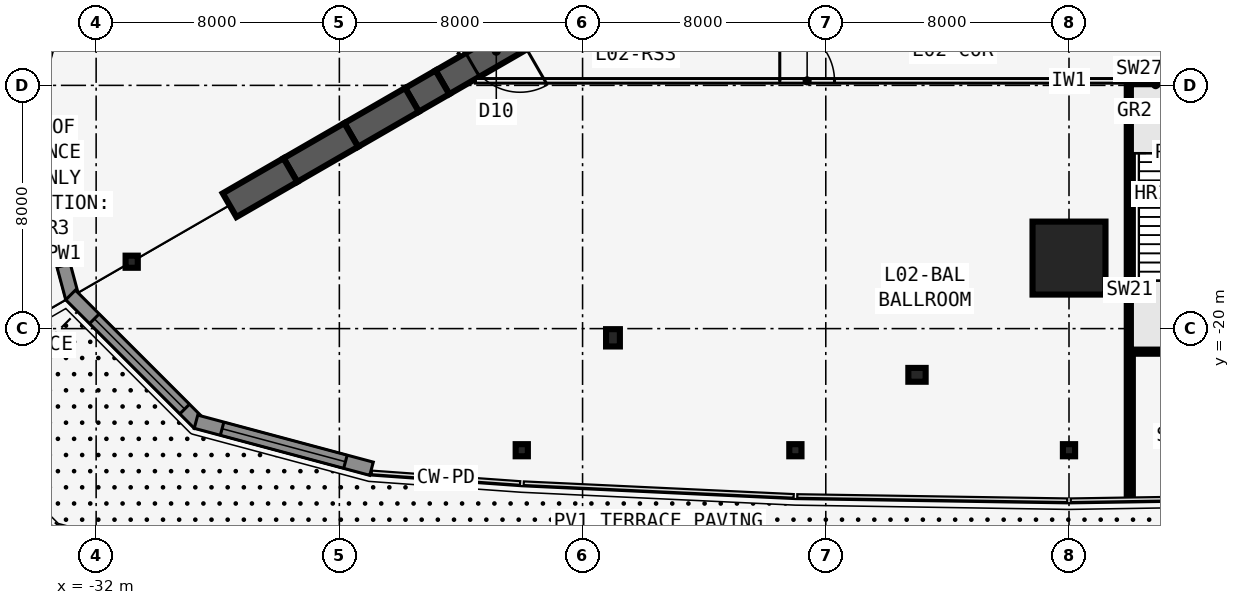
"""IFC4 building model, lengths in metres.
Left out: names, types, materials, properties, quantities, classifications, styles, units other than length and angle.
Written with IfcOpenShell. Run it as: python <this file> out.ifc"""

import sys

from ifc_helpers import new_model, si_unit, direction, frame, frame_2d, origin, origin_2d, place, context, subcontext, project, spatial, rectangle, i_section, extrude, element, fill, save


model = new_model("IFC4")
c1 = context("Model", 3, precision=1e-05, world=origin(), true_north=direction((0.0, 1.0)))
c2 = subcontext(c1, "Body", "Model", "MODEL_VIEW")
j1 = project(units=[si_unit("LENGTHUNIT", "METRE"), si_unit("PLANEANGLEUNIT", "RADIAN")], contexts=[c1])
p1 = place(None, origin())
s1 = spatial("IfcSite", under=j1, at=p1, CompositionType="ELEMENT")
p2 = place(p1, origin())
s2 = spatial("IfcBuilding", under=s1, at=p2, CompositionType="ELEMENT")
p3 = place(p2, frame((0.0, 0.0, 11.0)))
s3 = spatial("IfcBuildingStorey", under=s2, at=p3, CompositionType="ELEMENT", Elevation=11.0)
p4 = place(p3, frame((-16.5, -9.526, 0.0), z_axis=(0.0, 0.0, 1.0), x_axis=(-0.866031398331, -0.499989616998, 0.0)))
e1 = element("IfcWall", 1, at=p4, inside=s3, PredefinedType="SHEAR", context=c2, shape_type="SweptSolid", body=[
    extrude(rectangle(XDim=4.746, YDim=0.9, at=frame_2d((2.373, 0.0))), origin(), (0.0, 0.0, 1.0), 6.5),
])
p5 = place(p4, frame((1.8, 0.0, 0.0)))
e2 = element("IfcOpeningElement", 2, at=p5, cuts=e1, PredefinedType="OPENING", context=c2, shape_type="SweptSolid", body=[
    extrude(rectangle(XDim=1.8, YDim=2.13, at=frame_2d((0.9, 1.065))), frame((0.0, 0.46, 0.0), z_axis=(0.0, -1.0, 0.0), x_axis=(1.0, 0.0, 0.0)), (0.0, 0.0, 1.0), 0.92),
])
p6 = place(p3, frame((-20.61, -11.899, 0.0), z_axis=(0.0, 0.0, 1.0), x_axis=(-0.866009537788, -0.500027479704, 0.0)))
e3 = element("IfcWall", 3, at=p6, inside=s3, PredefinedType="SHEAR", context=c2, shape_type="SweptSolid", body=[
    extrude(rectangle(XDim=1.155, YDim=0.9, at=frame_2d((0.577, 0.0))), origin(), (0.0, 0.0, 1.0), 6.5),
])
for number, where, z_axis, x_axis in (
    (4, (-21.61, -12.477, 0.0), (0.0, 0.0, 1.0), (-0.866, -0.5, 0.0)),
    (5, (-23.61, -13.631, 0.0), (0.0, 0.0, 1.0), (-0.866, -0.5, 0.0)),
    (6, (-25.61, -14.786, 0.0), (0.0, 0.0, 1.0), (-0.866, -0.5, 0.0)),
):
    element("IfcWall", number, at=place(p3, frame(where, z_axis=z_axis, x_axis=x_axis)), inside=s3, PredefinedType="SHEAR", context=c2, shape_type="SweptSolid", body=[
        extrude(rectangle(XDim=2.309, YDim=0.9, at=frame_2d((1.155, 0.0))), origin(), (0.0, 0.0, 1.0), 6.5),
    ])
for number, where, z_axis, x_axis in (
    (7, (-15.0, -20.303, 0.0), (0.0, 0.0, 1.0), (1.0, 0.0, 0.0)),
    (8, (-5.0, -21.521, 0.0), (0.0, 0.0, 1.0), (0.0, -1.0, 0.0)),
):
    element("IfcColumn", number, at=place(p3, frame(where, z_axis=z_axis, x_axis=x_axis)), inside=s3, PredefinedType="COLUMN", context=c2, shape_type="SweptSolid", body=[
        extrude(i_section(OverallWidth=0.455, OverallDepth=0.569, WebThickness=0.078, FlangeThickness=0.125, at=origin_2d()), origin(), (0.0, 0.0, 1.0), 6.5),
    ])
for number, where, z_axis, x_axis in (
    (9, (-30.831, -17.8, 0.0), (0.0, 0.0, 1.0), (1.0, 0.0, 0.0)),
    (10, (-18.0, -24.0, 0.0), (0.0, 0.0, 1.0), (1.0, 0.0, 0.0)),
    (11, (-9.0, -24.0, 0.0), (0.0, 0.0, 1.0), (1.0, 0.0, 0.0)),
    (12, (0.0, -24.0, 0.0), (0.0, 0.0, 1.0), (1.0, 0.0, 0.0)),
):
    element("IfcColumn", number, at=place(p3, frame(where, z_axis=z_axis, x_axis=x_axis)), inside=s3, PredefinedType="COLUMN", context=c2, shape_type="SweptSolid", body=[
        extrude(i_section(OverallWidth=0.401, OverallDepth=0.399, WebThickness=0.025, FlangeThickness=0.04, at=origin_2d()), origin(), (0.0, 0.0, 1.0), 6.5),
    ])
p7 = place(p3, frame((0.0, -17.68, 0.0), z_axis=(0.0, 0.0, 1.0), x_axis=(0.0, -1.0, 0.0)))
e13 = element("IfcColumn", 13, at=p7, inside=s3, PredefinedType="COLUMN", context=c2, shape_type="SweptSolid", body=[
    extrude(rectangle(XDim=2.4, YDim=2.4, at=origin_2d()), origin(), (0.0, 0.0, 1.0), 6.5),
])
p8 = place(p3, frame((-32.783, -7.564, 0.0), z_axis=(0.0, 0.0, 1.0), x_axis=(-0.258791208569, -0.965933284636, 0.0)))
e14 = element("IfcWall", 14, at=p8, inside=s3, PredefinedType="SOLIDWALL", context=c2, shape_type="SweptSolid", body=[
    extrude(rectangle(XDim=5.977, YDim=0.45, at=frame_2d((2.989, 0.0))), origin(), (0.0, 0.0, 1.0), 6.25),
])
p9 = place(p8, frame((0.889, 0.0, 1.2)))
e15 = element("IfcOpeningElement", 15, at=p9, cuts=e14, PredefinedType="OPENING", context=c2, shape_type="SweptSolid", body=[
    extrude(rectangle(XDim=4.2, YDim=3.6, at=frame_2d((2.1, 1.8))), frame((0.0, 0.235, 0.0), z_axis=(0.0, -1.0, 0.0), x_axis=(1.0, 0.0, 0.0)), (0.0, 0.0, 1.0), 0.47),
])
p10 = place(p3, frame((-34.33, -13.221, 0.0), z_axis=(0.0, 0.0, 1.0), x_axis=(0.258801419081, -0.965930548995, 0.0)))
e16 = element("IfcWall", 16, at=p10, inside=s3, PredefinedType="SOLIDWALL", context=c2, shape_type="SweptSolid", body=[
    extrude(rectangle(XDim=5.977, YDim=0.45, at=frame_2d((2.989, 0.0))), origin(), (0.0, 0.0, 1.0), 6.25),
])
p11 = place(p10, frame((0.67, 0.0, 1.2)))
e17 = element("IfcOpeningElement", 17, at=p11, cuts=e16, PredefinedType="OPENING", context=c2, shape_type="SweptSolid", body=[
    extrude(rectangle(XDim=4.2, YDim=3.6, at=frame_2d((2.1, 1.8))), frame((0.0, 0.235, 0.0), z_axis=(0.0, -1.0, 0.0), x_axis=(1.0, 0.0, 0.0)), (0.0, 0.0, 1.0), 0.47),
])
p12 = place(p3, frame((-32.841, -18.894, 0.0), z_axis=(0.0, 0.0, 1.0), x_axis=(0.707086357855, -0.707127203928, 0.0)))
e18 = element("IfcWall", 18, at=p12, inside=s3, PredefinedType="SOLIDWALL", context=c2, shape_type="SweptSolid", body=[
    extrude(rectangle(XDim=5.977, YDim=0.45, at=frame_2d((2.989, 0.0))), origin(), (0.0, 0.0, 1.0), 6.25),
])
p13 = place(p12, frame((1.107, 0.0, 1.2)))
e19 = element("IfcOpeningElement", 19, at=p13, cuts=e18, PredefinedType="OPENING", context=c2, shape_type="SweptSolid", body=[
    extrude(rectangle(XDim=4.2, YDim=3.6, at=frame_2d((2.1, 1.8))), frame((0.0, 0.235, 0.0), z_axis=(0.0, -1.0, 0.0), x_axis=(1.0, 0.0, 0.0)), (0.0, 0.0, 1.0), 0.47),
])
p14 = place(p3, frame((-28.715, -23.062, 0.0), z_axis=(0.0, 0.0, 1.0), x_axis=(0.965920337451, -0.258839528858, 0.0)))
e20 = element("IfcWall", 20, at=p14, inside=s3, PredefinedType="SOLIDWALL", context=c2, shape_type="SweptSolid", body=[
    extrude(rectangle(XDim=5.977, YDim=0.45, at=frame_2d((2.989, 0.0))), origin(), (0.0, 0.0, 1.0), 6.25),
])
p15 = place(p14, frame((0.889, 0.0, 1.2)))
e21 = element("IfcOpeningElement", 21, at=p15, cuts=e20, PredefinedType="OPENING", context=c2, shape_type="SweptSolid", body=[
    extrude(rectangle(XDim=4.2, YDim=3.6, at=frame_2d((2.1, 1.8))), frame((0.0, 0.235, 0.0), z_axis=(0.0, -1.0, 0.0), x_axis=(1.0, 0.0, 0.0)), (0.0, 0.0, 1.0), 0.47),
])
p16 = place(p3, frame((-19.527, -11.851, 0.0), z_axis=(0.0, 0.0, 1.0), x_axis=(1.0, 0.0, 0.0)))
e22 = element("IfcWall", 22, at=p16, inside=s3, PredefinedType="PARTITIONING", context=c2, shape_type="SweptSolid", body=[
    extrude(rectangle(XDim=39.054, YDim=0.15, at=frame_2d((19.527, 0.0))), origin(), (0.0, 0.0, 1.0), 5.308),
])
p17 = place(p16, frame((10.013, 0.0, 0.0)))
e23 = element("IfcOpeningElement", 23, at=p17, cuts=e22, PredefinedType="OPENING", context=c2, shape_type="SweptSolid", body=[
    extrude(rectangle(XDim=1.8, YDim=2.13, at=frame_2d((0.9, 1.065))), frame((0.0, 0.085, 0.0), z_axis=(0.0, -1.0, 0.0), x_axis=(1.0, 0.0, 0.0)), (0.0, 0.0, 1.0), 0.17),
])
p18 = place(p16, frame((23.227, 0.0, 0.0)))
e24 = element("IfcOpeningElement", 24, at=p18, cuts=e22, PredefinedType="OPENING", context=c2, shape_type="SweptSolid", body=[
    extrude(rectangle(XDim=1.8, YDim=2.13, at=frame_2d((0.9, 1.065))), frame((0.0, 0.085, 0.0), z_axis=(0.0, -1.0, 0.0), x_axis=(1.0, 0.0, 0.0)), (0.0, 0.0, 1.0), 0.17),
])
p19 = place(p16, frame((31.841, 0.0, 0.0)))
e25 = element("IfcOpeningElement", 25, at=p19, cuts=e22, PredefinedType="OPENING", context=c2, shape_type="SweptSolid", body=[
    extrude(rectangle(XDim=1.8, YDim=2.13, at=frame_2d((0.9, 1.065))), frame((0.0, 0.085, 0.0), z_axis=(0.0, -1.0, 0.0), x_axis=(1.0, 0.0, 0.0)), (0.0, 0.0, 1.0), 0.17),
])
p20 = place(p3, frame((2.0, -11.926, 0.0), z_axis=(0.0, 0.0, 1.0), x_axis=(0.0, -1.0, 0.0)))
e26 = element("IfcWall", 26, at=p20, inside=s3, PredefinedType="SHEAR", context=c2, shape_type="SweptSolid", body=[
    extrude(rectangle(XDim=13.607, YDim=0.2, at=frame_2d((6.804, 0.0))), origin(), (0.0, 0.0, 1.0), 6.5),
])
p21 = place(p3, frame((20.027, -10.985, 0.0), z_axis=(0.0, 0.0, 1.0), x_axis=(-0.500001677587, 0.866024435227, 0.0)))
e27 = element("IfcWall", 27, at=p21, inside=s3, PredefinedType="PARTITIONING", context=c2, shape_type="SweptSolid", body=[
    extrude(rectangle(XDim=39.054, YDim=0.15, at=frame_2d((19.527, 0.0))), origin(), (0.0, 0.0, 1.0), 5.308),
])
p22 = place(p21, frame((10.013, 0.0, 0.0)))
e28 = element("IfcOpeningElement", 28, at=p22, cuts=e27, PredefinedType="OPENING", context=c2, shape_type="SweptSolid", body=[
    extrude(rectangle(XDim=1.8, YDim=2.13, at=frame_2d((0.9, 1.065))), frame((0.0, 0.085, 0.0), z_axis=(0.0, -1.0, 0.0), x_axis=(1.0, 0.0, 0.0)), (0.0, 0.0, 1.0), 0.17),
])
p23 = place(p21, frame((23.227, 0.0, 0.0)))
e29 = element("IfcOpeningElement", 29, at=p23, cuts=e27, PredefinedType="OPENING", context=c2, shape_type="SweptSolid", body=[
    extrude(rectangle(XDim=1.8, YDim=2.13, at=frame_2d((0.9, 1.065))), frame((0.0, 0.085, 0.0), z_axis=(0.0, -1.0, 0.0), x_axis=(1.0, 0.0, 0.0)), (0.0, 0.0, 1.0), 0.17),
])
p24 = place(p21, frame((27.627, 0.0, 0.0)))
e30 = element("IfcOpeningElement", 30, at=p24, cuts=e27, PredefinedType="OPENING", context=c2, shape_type="SweptSolid", body=[
    extrude(rectangle(XDim=1.0, YDim=2.13, at=frame_2d((0.5, 1.065))), frame((0.0, 0.085, 0.0), z_axis=(0.0, -1.0, 0.0), x_axis=(1.0, 0.0, 0.0)), (0.0, 0.0, 1.0), 0.17),
])
p25 = place(p21, frame((30.527, 0.0, 0.0)))
e31 = element("IfcOpeningElement", 31, at=p25, cuts=e27, PredefinedType="OPENING", context=c2, shape_type="SweptSolid", body=[
    extrude(rectangle(XDim=1.0, YDim=2.13, at=frame_2d((0.5, 1.065))), frame((0.0, 0.085, 0.0), z_axis=(0.0, -1.0, 0.0), x_axis=(1.0, 0.0, 0.0)), (0.0, 0.0, 1.0), 0.17),
])
p26 = place(p21, frame((33.277, 0.0, 0.0)))
e32 = element("IfcOpeningElement", 32, at=p26, cuts=e27, PredefinedType="OPENING", context=c2, shape_type="SweptSolid", body=[
    extrude(rectangle(XDim=1.0, YDim=2.13, at=frame_2d((0.5, 1.065))), frame((0.0, 0.085, 0.0), z_axis=(0.0, -1.0, 0.0), x_axis=(1.0, 0.0, 0.0)), (0.0, 0.0, 1.0), 0.17),
])
p27 = place(p21, frame((35.99, 0.0, 0.0)))
e33 = element("IfcOpeningElement", 33, at=p27, cuts=e27, PredefinedType="OPENING", context=c2, shape_type="SweptSolid", body=[
    extrude(rectangle(XDim=1.8, YDim=2.13, at=frame_2d((0.9, 1.065))), frame((0.0, 0.085, 0.0), z_axis=(0.0, -1.0, 0.0), x_axis=(1.0, 0.0, 0.0)), (0.0, 0.0, 1.0), 0.17),
])
p28 = place(p3, frame((-0.5, 22.836, 0.0), z_axis=(0.0, 0.0, 1.0), x_axis=(-0.500001677587, -0.866024435227, 0.0)))
e34 = element("IfcWall", 34, at=p28, inside=s3, PredefinedType="PARTITIONING", context=c2, shape_type="SweptSolid", body=[
    extrude(rectangle(XDim=39.054, YDim=0.15, at=frame_2d((19.527, 0.0))), origin(), (0.0, 0.0, 1.0), 5.308),
])
p29 = place(p28, frame((10.013, 0.0, 0.0)))
e35 = element("IfcOpeningElement", 35, at=p29, cuts=e34, PredefinedType="OPENING", context=c2, shape_type="SweptSolid", body=[
    extrude(rectangle(XDim=1.8, YDim=2.13, at=frame_2d((0.9, 1.065))), frame((0.0, 0.085, 0.0), z_axis=(0.0, -1.0, 0.0), x_axis=(1.0, 0.0, 0.0)), (0.0, 0.0, 1.0), 0.17),
])
p30 = place(p28, frame((23.227, 0.0, 0.0)))
e36 = element("IfcOpeningElement", 36, at=p30, cuts=e34, PredefinedType="OPENING", context=c2, shape_type="SweptSolid", body=[
    extrude(rectangle(XDim=1.8, YDim=2.13, at=frame_2d((0.9, 1.065))), frame((0.0, 0.085, 0.0), z_axis=(0.0, -1.0, 0.0), x_axis=(1.0, 0.0, 0.0)), (0.0, 0.0, 1.0), 0.17),
])
p31 = place(p28, frame((27.627, 0.0, 0.0)))
e37 = element("IfcOpeningElement", 37, at=p31, cuts=e34, PredefinedType="OPENING", context=c2, shape_type="SweptSolid", body=[
    extrude(rectangle(XDim=1.0, YDim=2.13, at=frame_2d((0.5, 1.065))), frame((0.0, 0.085, 0.0), z_axis=(0.0, -1.0, 0.0), x_axis=(1.0, 0.0, 0.0)), (0.0, 0.0, 1.0), 0.17),
])
p32 = place(p28, frame((30.277, 0.0, 0.0)))
e38 = element("IfcOpeningElement", 38, at=p32, cuts=e34, PredefinedType="OPENING", context=c2, shape_type="SweptSolid", body=[
    extrude(rectangle(XDim=1.0, YDim=2.13, at=frame_2d((0.5, 1.065))), frame((0.0, 0.085, 0.0), z_axis=(0.0, -1.0, 0.0), x_axis=(1.0, 0.0, 0.0)), (0.0, 0.0, 1.0), 0.17),
])
p33 = place(p28, frame((34.89, 0.0, 0.0)))
e39 = element("IfcOpeningElement", 39, at=p33, cuts=e34, PredefinedType="OPENING", context=c2, shape_type="SweptSolid", body=[
    extrude(rectangle(XDim=1.0, YDim=2.13, at=frame_2d((0.5, 1.065))), frame((0.0, 0.085, 0.0), z_axis=(0.0, -1.0, 0.0), x_axis=(1.0, 0.0, 0.0)), (0.0, 0.0, 1.0), 0.17),
])
p34 = place(p3, frame((2.0, -20.726, 0.0), z_axis=(0.0, 0.0, 1.0), x_axis=(1.0, 0.0, 0.0)))
e40 = element("IfcWall", 40, at=p34, inside=s3, PredefinedType="SHEAR", context=c2, shape_type="SweptSolid", body=[
    extrude(rectangle(XDim=5.2, YDim=0.2, at=frame_2d((2.6, 0.0))), origin(), (0.0, 0.0, 1.0), 6.5),
])
p35 = place(p3, frame((2.1, -11.976, 0.0), z_axis=(0.0, 0.0, 1.0), x_axis=(1.0, 0.0, 0.0)))
e41 = element("IfcWall", 41, at=p35, inside=s3, PredefinedType="SOLIDWALL", context=c2, shape_type="SweptSolid", body=[
    extrude(rectangle(XDim=1.5, YDim=0.1, at=frame_2d((0.75, 0.0))), origin(), (0.0, 0.0, 1.0), 6.5),
])
p36 = place(p9, origin())
e42 = element("IfcWindow", 42, at=p36, inside=s3, PartitioningType="SINGLE_PANEL", PredefinedType="WINDOW", context=c2, shape_type="SweptSolid", body=[
    extrude(rectangle(XDim=4.2, YDim=3.6, at=frame_2d((2.1, 1.8))), frame((0.0, 0.03, 0.0), z_axis=(0.0, -1.0, 0.0), x_axis=(1.0, 0.0, 0.0)), (0.0, 0.0, 1.0), 0.06),
])
fill(e15, e42)
p37 = place(p11, origin())
e43 = element("IfcWindow", 43, at=p37, inside=s3, PartitioningType="SINGLE_PANEL", PredefinedType="WINDOW", context=c2, shape_type="SweptSolid", body=[
    extrude(rectangle(XDim=4.2, YDim=3.6, at=frame_2d((2.1, 1.8))), frame((0.0, 0.03, 0.0), z_axis=(0.0, -1.0, 0.0), x_axis=(1.0, 0.0, 0.0)), (0.0, 0.0, 1.0), 0.06),
])
fill(e17, e43)
p38 = place(p13, origin())
e44 = element("IfcWindow", 44, at=p38, inside=s3, PartitioningType="SINGLE_PANEL", PredefinedType="WINDOW", context=c2, shape_type="SweptSolid", body=[
    extrude(rectangle(XDim=4.2, YDim=3.6, at=frame_2d((2.1, 1.8))), frame((0.0, 0.03, 0.0), z_axis=(0.0, -1.0, 0.0), x_axis=(1.0, 0.0, 0.0)), (0.0, 0.0, 1.0), 0.06),
])
fill(e19, e44)
p39 = place(p15, origin())
e45 = element("IfcWindow", 45, at=p39, inside=s3, PartitioningType="SINGLE_PANEL", PredefinedType="WINDOW", context=c2, shape_type="SweptSolid", body=[
    extrude(rectangle(XDim=4.2, YDim=3.6, at=frame_2d((2.1, 1.8))), frame((0.0, 0.03, 0.0), z_axis=(0.0, -1.0, 0.0), x_axis=(1.0, 0.0, 0.0)), (0.0, 0.0, 1.0), 0.06),
])
fill(e21, e45)
p40 = place(p17, origin())
e46 = element("IfcDoor", 46, at=p40, inside=s3, OperationType="DOUBLE_DOOR_SINGLE_SWING", PredefinedType="DOOR", context=c2, shape_type="SweptSolid", body=[
    extrude(rectangle(XDim=1.8, YDim=2.13, at=frame_2d((0.9, 1.065))), frame((0.0, 0.025, 0.0), z_axis=(0.0, -1.0, 0.0), x_axis=(1.0, 0.0, 0.0)), (0.0, 0.0, 1.0), 0.05),
])
fill(e23, e46)
p41 = place(p5, origin())
e47 = element("IfcDoor", 47, at=p41, inside=s3, OperationType="DOUBLE_DOOR_DOUBLE_SWING", PredefinedType="DOOR", context=c2, shape_type="SweptSolid", body=[
    extrude(rectangle(XDim=1.8, YDim=2.13, at=frame_2d((0.9, 1.065))), frame((0.0, 0.025, 0.0), z_axis=(0.0, -1.0, 0.0), x_axis=(1.0, 0.0, 0.0)), (0.0, 0.0, 1.0), 0.05),
])
fill(e2, e47)
save(model, sys.argv[1])
